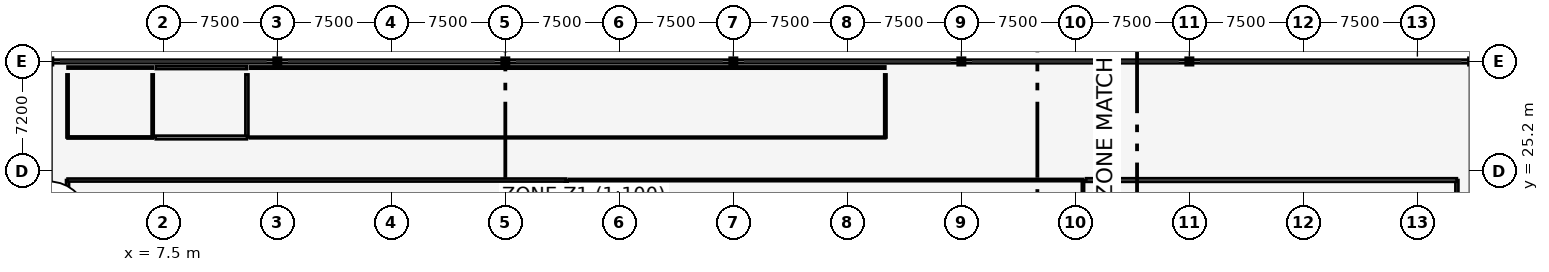
"""IFC4 building model, lengths in metres.
Left out: names, types, materials, properties, quantities, classifications, styles, units other than length and angle.
Written with IfcOpenShell. Run it as: python <this file> out.ifc"""

import sys

from ifc_helpers import new_model, si_unit, direction, frame, frame_2d, origin, origin_2d, place, context, subcontext, project, spatial, rectangle, i_section, extrude, element, fill, save


model = new_model("IFC4")
c1 = context("Model", 3, precision=1e-05, world=origin(), true_north=direction((0.0, 1.0)))
c2 = subcontext(c1, "Body", "Model", "MODEL_VIEW")
j1 = project(units=[si_unit("LENGTHUNIT", "METRE"), si_unit("PLANEANGLEUNIT", "RADIAN")], contexts=[c1])
p1 = place(None, origin())
s1 = spatial("IfcSite", under=j1, at=p1, CompositionType="ELEMENT")
p2 = place(p1, origin())
s2 = spatial("IfcBuilding", under=s1, at=p2, CompositionType="ELEMENT")
p3 = place(p2, frame((0.0, 0.0, 9.0)))
s3 = spatial("IfcBuildingStorey", under=s2, at=p3, CompositionType="ELEMENT", Elevation=9.0)
for number, where, z_axis, x_axis in (
    (1, (15.0, 32.4, 0.0), (0.0, 0.0, 1.0), (1.0, 0.0, 0.0)),
    (2, (30.0, 32.4, 0.0), (0.0, 0.0, 1.0), (1.0, 0.0, 0.0)),
    (3, (45.0, 32.4, 0.0), (0.0, 0.0, 1.0), (1.0, 0.0, 0.0)),
    (4, (60.0, 32.4, 0.0), (0.0, 0.0, 1.0), (1.0, 0.0, 0.0)),
    (5, (75.0, 32.4, 0.0), (0.0, 0.0, 1.0), (1.0, 0.0, 0.0)),
):
    element("IfcColumn", number, at=place(p3, frame(where, z_axis=z_axis, x_axis=x_axis)), inside=s3, PredefinedType="COLUMN", context=c2, shape_type="SweptSolid", body=[
        extrude(i_section(OverallWidth=0.307, OverallDepth=0.315, WebThickness=0.012, FlangeThickness=0.019, at=origin_2d()), origin(), (0.0, 0.0, 1.0), 4.2),
    ])
p4 = place(p3, frame((0.0, 32.4, 0.0), z_axis=(0.0, 0.0, 1.0), x_axis=(1.0, 0.0, 0.0)))
e6 = element("IfcWall", 6, at=p4, inside=s3, PredefinedType="PARAPET", context=c2, shape_type="SweptSolid", body=[
    extrude(rectangle(XDim=45.0, YDim=0.24, at=frame_2d((22.5, 0.0))), origin(), (0.0, 0.0, 1.0), 1.15),
])
p5 = place(p3, frame((45.0, 32.4, 0.0), z_axis=(0.0, 0.0, 1.0), x_axis=(1.0, 0.0, 0.0)))
e7 = element("IfcWall", 7, at=p5, inside=s3, PredefinedType="PARAPET", context=c2, shape_type="SweptSolid", body=[
    extrude(rectangle(XDim=48.6, YDim=0.24, at=frame_2d((24.3, 0.0))), origin(), (0.0, 0.0, 1.0), 1.15),
])
for number, where, z_axis, x_axis in (
    (8, (34.0, 11.85, 0.0), (0.0, 0.0, 1.0), (0.0, 1.0, 0.0)),
    (9, (1.2, 24.6, 0.0), (0.0, 0.0, 1.0), (0.0, -1.0, 0.0)),
):
    element("IfcWall", number, at=place(p3, frame(where, z_axis=z_axis, x_axis=x_axis)), inside=s3, PredefinedType="SOLIDWALL", context=c2, shape_type="SweptSolid", body=[
        extrude(rectangle(XDim=12.75, YDim=0.2, at=frame_2d((6.375, 0.0))), origin(), (0.0, 0.0, 1.0), 3.6),
    ])
p6 = place(p3, frame((1.2, 24.6, 0.0), z_axis=(0.0, 0.0, 1.0), x_axis=(1.0, 0.0, 0.0)))
e10 = element("IfcWall", 10, at=p6, inside=s3, PredefinedType="SOLIDWALL", context=c2, shape_type="SweptSolid", body=[
    extrude(rectangle(XDim=32.8, YDim=0.2, at=frame_2d((16.4, 0.0))), origin(), (0.0, 0.0, 1.0), 3.287),
])
p7 = place(p6, frame((15.5, 0.0, 0.0)))
e11 = element("IfcOpeningElement", 11, at=p7, cuts=e10, PredefinedType="OPENING", context=c2, shape_type="SweptSolid", body=[
    extrude(rectangle(XDim=1.8, YDim=2.2, at=frame_2d((0.9, 1.1))), frame((0.0, 0.11, 0.0), z_axis=(0.0, -1.0, 0.0), x_axis=(1.0, 0.0, 0.0)), (0.0, 0.0, 1.0), 0.22),
])
p8 = place(p6, frame((27.8, 0.0, 0.0)))
e12 = element("IfcOpeningElement", 12, at=p8, cuts=e10, PredefinedType="OPENING", context=c2, shape_type="SweptSolid", body=[
    extrude(rectangle(XDim=1.8, YDim=2.2, at=frame_2d((0.9, 1.1))), frame((0.0, 0.11, 0.0), z_axis=(0.0, -1.0, 0.0), x_axis=(1.0, 0.0, 0.0)), (0.0, 0.0, 1.0), 0.22),
])
p9 = place(p3, frame((68.0, 11.85, 0.0), z_axis=(0.0, 0.0, 1.0), x_axis=(0.0, 1.0, 0.0)))
e13 = element("IfcWall", 13, at=p9, inside=s3, PredefinedType="PARTITIONING", context=c2, shape_type="SweptSolid", body=[
    extrude(rectangle(XDim=12.75, YDim=0.15, at=frame_2d((6.375, 0.0))), origin(), (0.0, 0.0, 1.0), 3.6),
])
p10 = place(p3, frame((34.2, 24.6, 0.0), z_axis=(0.0, 0.0, 1.0), x_axis=(1.0, 0.0, 0.0)))
e14 = element("IfcWall", 14, at=p10, inside=s3, PredefinedType="PARTITIONING", context=c2, shape_type="SweptSolid", body=[
    extrude(rectangle(XDim=33.8, YDim=0.15, at=frame_2d((16.9, 0.0))), origin(), (0.0, 0.0, 1.0), 3.235),
])
p11 = place(p10, frame((16.38, 0.0, 0.0)))
e15 = element("IfcOpeningElement", 15, at=p11, cuts=e14, PredefinedType="OPENING", context=c2, shape_type="SweptSolid", body=[
    extrude(rectangle(XDim=1.04, YDim=2.15, at=frame_2d((0.52, 1.075))), frame((0.0, 0.085, 0.0), z_axis=(0.0, -1.0, 0.0), x_axis=(1.0, 0.0, 0.0)), (0.0, 0.0, 1.0), 0.17),
])
p12 = place(p10, frame((29.56, 0.0, 0.0)))
e16 = element("IfcOpeningElement", 16, at=p12, cuts=e14, PredefinedType="OPENING", context=c2, shape_type="SweptSolid", body=[
    extrude(rectangle(XDim=1.04, YDim=2.15, at=frame_2d((0.52, 1.075))), frame((0.0, 0.085, 0.0), z_axis=(0.0, -1.0, 0.0), x_axis=(1.0, 0.0, 0.0)), (0.0, 0.0, 1.0), 0.17),
])
p13 = place(p3, frame((92.6, 11.85, 0.0), z_axis=(0.0, 0.0, 1.0), x_axis=(0.0, 1.0, 0.0)))
e17 = element("IfcWall", 17, at=p13, inside=s3, PredefinedType="SOLIDWALL", context=c2, shape_type="SweptSolid", body=[
    extrude(rectangle(XDim=12.75, YDim=0.2, at=frame_2d((6.375, 0.0))), origin(), (0.0, 0.0, 1.0), 3.6),
])
p14 = place(p3, frame((68.2, 24.6, 0.0), z_axis=(0.0, 0.0, 1.0), x_axis=(1.0, 0.0, 0.0)))
e18 = element("IfcWall", 18, at=p14, inside=s3, PredefinedType="SOLIDWALL", context=c2, shape_type="SweptSolid", body=[
    extrude(rectangle(XDim=24.4, YDim=0.24, at=frame_2d((12.2, 0.0))), origin(), (0.0, 0.0, 1.0), 3.185),
])
p15 = place(p14, frame((11.4, 0.0, 0.0)))
e19 = element("IfcOpeningElement", 19, at=p15, cuts=e18, PredefinedType="OPENING", context=c2, shape_type="SweptSolid", body=[
    extrude(rectangle(XDim=1.6, YDim=2.15, at=frame_2d((0.8, 1.075))), frame((0.0, 0.13, 0.0), z_axis=(0.0, -1.0, 0.0), x_axis=(1.0, 0.0, 0.0)), (0.0, 0.0, 1.0), 0.26),
])
p16 = place(p3, frame((1.2, 32.0, 0.0), z_axis=(0.0, 0.0, 1.0), x_axis=(1.0, 0.0, 0.0)))
e20 = element("IfcWall", 20, at=p16, inside=s3, PredefinedType="PARTITIONING", context=c2, shape_type="SweptSolid", body=[
    extrude(rectangle(XDim=5.6, YDim=0.14, at=frame_2d((2.8, 0.0))), origin(), (0.0, 0.0, 1.0), 3.5),
])
for number, where, z_axis, x_axis in (
    (21, (6.8, 27.4, 0.0), (0.0, 0.0, 1.0), (0.0, 1.0, 0.0)),
    (22, (1.2, 31.55, 0.0), (0.0, 0.0, 1.0), (0.0, -1.0, 0.0)),
):
    element("IfcWall", number, at=place(p3, frame(where, z_axis=z_axis, x_axis=x_axis)), inside=s3, PredefinedType="PARTITIONING", context=c2, shape_type="SweptSolid", body=[
        extrude(rectangle(XDim=4.15, YDim=0.14, at=frame_2d((2.075, 0.0))), origin(), (0.0, 0.0, 1.0), 3.5),
    ])
p17 = place(p3, frame((6.8, 27.4, 0.0), z_axis=(0.0, 0.0, 1.0), x_axis=(-1.0, 0.0, 0.0)))
e23 = element("IfcWall", 23, at=p17, inside=s3, PredefinedType="PARTITIONING", context=c2, shape_type="SweptSolid", body=[
    extrude(rectangle(XDim=5.6, YDim=0.14, at=frame_2d((2.8, 0.0))), origin(), (0.0, 0.0, 1.0), 3.5),
])
p18 = place(p17, frame((2.305, 0.0, 0.0)))
e24 = element("IfcOpeningElement", 24, at=p18, cuts=e23, PredefinedType="OPENING", context=c2, shape_type="SweptSolid", body=[
    extrude(rectangle(XDim=0.99, YDim=2.15, at=frame_2d((0.495, 1.075))), frame((0.0, 0.08, 0.0), z_axis=(0.0, -1.0, 0.0), x_axis=(1.0, 0.0, 0.0)), (0.0, 0.0, 1.0), 0.16),
])
p19 = place(p3, frame((7.0, 32.0, 0.0), z_axis=(0.0, 0.0, 1.0), x_axis=(1.0, 0.0, 0.0)))
e25 = element("IfcWall", 25, at=p19, inside=s3, PredefinedType="SOLIDWALL", context=c2, shape_type="SweptSolid", body=[
    extrude(rectangle(XDim=6.0, YDim=0.2, at=frame_2d((3.0, 0.0))), origin(), (0.0, 0.0, 1.0), 3.5),
])
p20 = place(p3, frame((13.0, 27.4, 0.0), z_axis=(0.0, 0.0, 1.0), x_axis=(0.0, 1.0, 0.0)))
e26 = element("IfcWall", 26, at=p20, inside=s3, PredefinedType="SOLIDWALL", context=c2, shape_type="SweptSolid", body=[
    extrude(rectangle(XDim=4.15, YDim=0.2, at=frame_2d((2.075, 0.0))), origin(), (0.0, 0.0, 1.0), 3.5),
])
p21 = place(p3, frame((13.0, 27.4, 0.0), z_axis=(0.0, 0.0, 1.0), x_axis=(-1.0, 0.0, 0.0)))
e27 = element("IfcWall", 27, at=p21, inside=s3, PredefinedType="SOLIDWALL", context=c2, shape_type="SweptSolid", body=[
    extrude(rectangle(XDim=6.0, YDim=0.24, at=frame_2d((3.0, 0.0))), origin(), (0.0, 0.0, 1.0), 3.5),
])
p22 = place(p21, frame((2.2, 0.0, 0.0)))
e28 = element("IfcOpeningElement", 28, at=p22, cuts=e27, PredefinedType="OPENING", context=c2, shape_type="SweptSolid", body=[
    extrude(rectangle(XDim=1.6, YDim=2.15, at=frame_2d((0.8, 1.075))), frame((0.0, 0.13, 0.0), z_axis=(0.0, -1.0, 0.0), x_axis=(1.0, 0.0, 0.0)), (0.0, 0.0, 1.0), 0.26),
])
p23 = place(p3, frame((13.2, 32.0, 0.0), z_axis=(0.0, 0.0, 1.0), x_axis=(1.0, 0.0, 0.0)))
e29 = element("IfcWall", 29, at=p23, inside=s3, PredefinedType="PARTITIONING", context=c2, shape_type="SweptSolid", body=[
    extrude(rectangle(XDim=41.8, YDim=0.15, at=frame_2d((20.9, 0.0))), origin(), (0.0, 0.0, 1.0), 3.287),
])
p24 = place(p3, frame((55.0, 27.4, 0.0), z_axis=(0.0, 0.0, 1.0), x_axis=(0.0, 1.0, 0.0)))
e30 = element("IfcWall", 30, at=p24, inside=s3, PredefinedType="PARTITIONING", context=c2, shape_type="SweptSolid", body=[
    extrude(rectangle(XDim=4.15, YDim=0.15, at=frame_2d((2.075, 0.0))), origin(), (0.0, 0.0, 1.0), 3.6),
])
p25 = place(p3, frame((55.0, 27.4, 0.0), z_axis=(0.0, 0.0, 1.0), x_axis=(-1.0, 0.0, 0.0)))
e31 = element("IfcWall", 31, at=p25, inside=s3, PredefinedType="PARTITIONING", context=c2, shape_type="SweptSolid", body=[
    extrude(rectangle(XDim=41.8, YDim=0.11, at=frame_2d((20.9, 0.0))), origin(), (0.0, 0.0, 1.0), 3.287),
])
p26 = place(p25, frame((20.415, 0.0, 0.0)))
e32 = element("IfcOpeningElement", 32, at=p26, cuts=e31, PredefinedType="OPENING", context=c2, shape_type="SweptSolid", body=[
    extrude(rectangle(XDim=0.97, YDim=2.15, at=frame_2d((0.485, 1.075))), frame((0.0, 0.065, 0.0), z_axis=(0.0, -1.0, 0.0), x_axis=(1.0, 0.0, 0.0)), (0.0, 0.0, 1.0), 0.13),
])
p27 = place(p25, frame((37.63, 0.0, 0.0)))
e33 = element("IfcOpeningElement", 33, at=p27, cuts=e31, PredefinedType="OPENING", context=c2, shape_type="SweptSolid", body=[
    extrude(rectangle(XDim=0.97, YDim=2.15, at=frame_2d((0.485, 1.075))), frame((0.0, 0.065, 0.0), z_axis=(0.0, -1.0, 0.0), x_axis=(1.0, 0.0, 0.0)), (0.0, 0.0, 1.0), 0.13),
])
p28 = place(p7, origin())
e34 = element("IfcDoor", 34, at=p28, inside=s3, OperationType="DOUBLE_SWING_LEFT", PredefinedType="DOOR", context=c2, shape_type="SweptSolid", body=[
    extrude(rectangle(XDim=1.8, YDim=2.2, at=frame_2d((0.9, 1.1))), frame((0.0, 0.025, 0.0), z_axis=(0.0, -1.0, 0.0), x_axis=(1.0, 0.0, 0.0)), (0.0, 0.0, 1.0), 0.05),
])
fill(e11, e34)
p29 = place(p8, origin())
e35 = element("IfcDoor", 35, at=p29, inside=s3, OperationType="DOUBLE_SWING_LEFT", PredefinedType="DOOR", context=c2, shape_type="SweptSolid", body=[
    extrude(rectangle(XDim=1.8, YDim=2.2, at=frame_2d((0.9, 1.1))), frame((0.0, 0.025, 0.0), z_axis=(0.0, -1.0, 0.0), x_axis=(1.0, 0.0, 0.0)), (0.0, 0.0, 1.0), 0.05),
])
fill(e12, e35)
p30 = place(p11, origin())
e36 = element("IfcDoor", 36, at=p30, inside=s3, OperationType="SINGLE_SWING_LEFT", PredefinedType="DOOR", context=c2, shape_type="SweptSolid", body=[
    extrude(rectangle(XDim=1.04, YDim=2.15, at=frame_2d((0.52, 1.075))), frame((0.0, 0.025, 0.0), z_axis=(0.0, -1.0, 0.0), x_axis=(1.0, 0.0, 0.0)), (0.0, 0.0, 1.0), 0.05),
])
fill(e15, e36)
p31 = place(p12, origin())
e37 = element("IfcDoor", 37, at=p31, inside=s3, OperationType="SINGLE_SWING_LEFT", PredefinedType="DOOR", context=c2, shape_type="SweptSolid", body=[
    extrude(rectangle(XDim=1.04, YDim=2.15, at=frame_2d((0.52, 1.075))), frame((0.0, 0.025, 0.0), z_axis=(0.0, -1.0, 0.0), x_axis=(1.0, 0.0, 0.0)), (0.0, 0.0, 1.0), 0.05),
])
fill(e16, e37)
p32 = place(p15, origin())
e38 = element("IfcDoor", 38, at=p32, inside=s3, OperationType="DOUBLE_SWING_RIGHT", PredefinedType="DOOR", context=c2, shape_type="SweptSolid", body=[
    extrude(rectangle(XDim=1.6, YDim=2.15, at=frame_2d((0.8, 1.075))), frame((0.0, 0.025, 0.0), z_axis=(0.0, -1.0, 0.0), x_axis=(1.0, 0.0, 0.0)), (0.0, 0.0, 1.0), 0.05),
])
fill(e19, e38)
p33 = place(p18, origin())
e39 = element("IfcDoor", 39, at=p33, inside=s3, OperationType="SINGLE_SWING_RIGHT", PredefinedType="DOOR", context=c2, shape_type="SweptSolid", body=[
    extrude(rectangle(XDim=0.99, YDim=2.15, at=frame_2d((0.495, 1.075))), frame((0.0, 0.025, 0.0), z_axis=(0.0, -1.0, 0.0), x_axis=(1.0, 0.0, 0.0)), (0.0, 0.0, 1.0), 0.05),
])
fill(e24, e39)
p34 = place(p22, origin())
e40 = element("IfcDoor", 40, at=p34, inside=s3, OperationType="DOUBLE_SWING_RIGHT", PredefinedType="DOOR", context=c2, shape_type="SweptSolid", body=[
    extrude(rectangle(XDim=1.6, YDim=2.15, at=frame_2d((0.8, 1.075))), frame((0.0, 0.025, 0.0), z_axis=(0.0, -1.0, 0.0), x_axis=(1.0, 0.0, 0.0)), (0.0, 0.0, 1.0), 0.05),
])
fill(e28, e40)
p35 = place(p26, origin())
e41 = element("IfcDoor", 41, at=p35, inside=s3, OperationType="SINGLE_SWING_RIGHT", PredefinedType="DOOR", context=c2, shape_type="SweptSolid", body=[
    extrude(rectangle(XDim=0.97, YDim=2.15, at=frame_2d((0.485, 1.075))), frame((0.0, 0.025, 0.0), z_axis=(0.0, -1.0, 0.0), x_axis=(1.0, 0.0, 0.0)), (0.0, 0.0, 1.0), 0.05),
])
fill(e32, e41)
p36 = place(p27, origin())
e42 = element("IfcDoor", 42, at=p36, inside=s3, OperationType="SINGLE_SWING_RIGHT", PredefinedType="DOOR", context=c2, shape_type="SweptSolid", body=[
    extrude(rectangle(XDim=0.97, YDim=2.15, at=frame_2d((0.485, 1.075))), frame((0.0, 0.025, 0.0), z_axis=(0.0, -1.0, 0.0), x_axis=(1.0, 0.0, 0.0)), (0.0, 0.0, 1.0), 0.05),
])
fill(e33, e42)
save(model, sys.argv[1])
